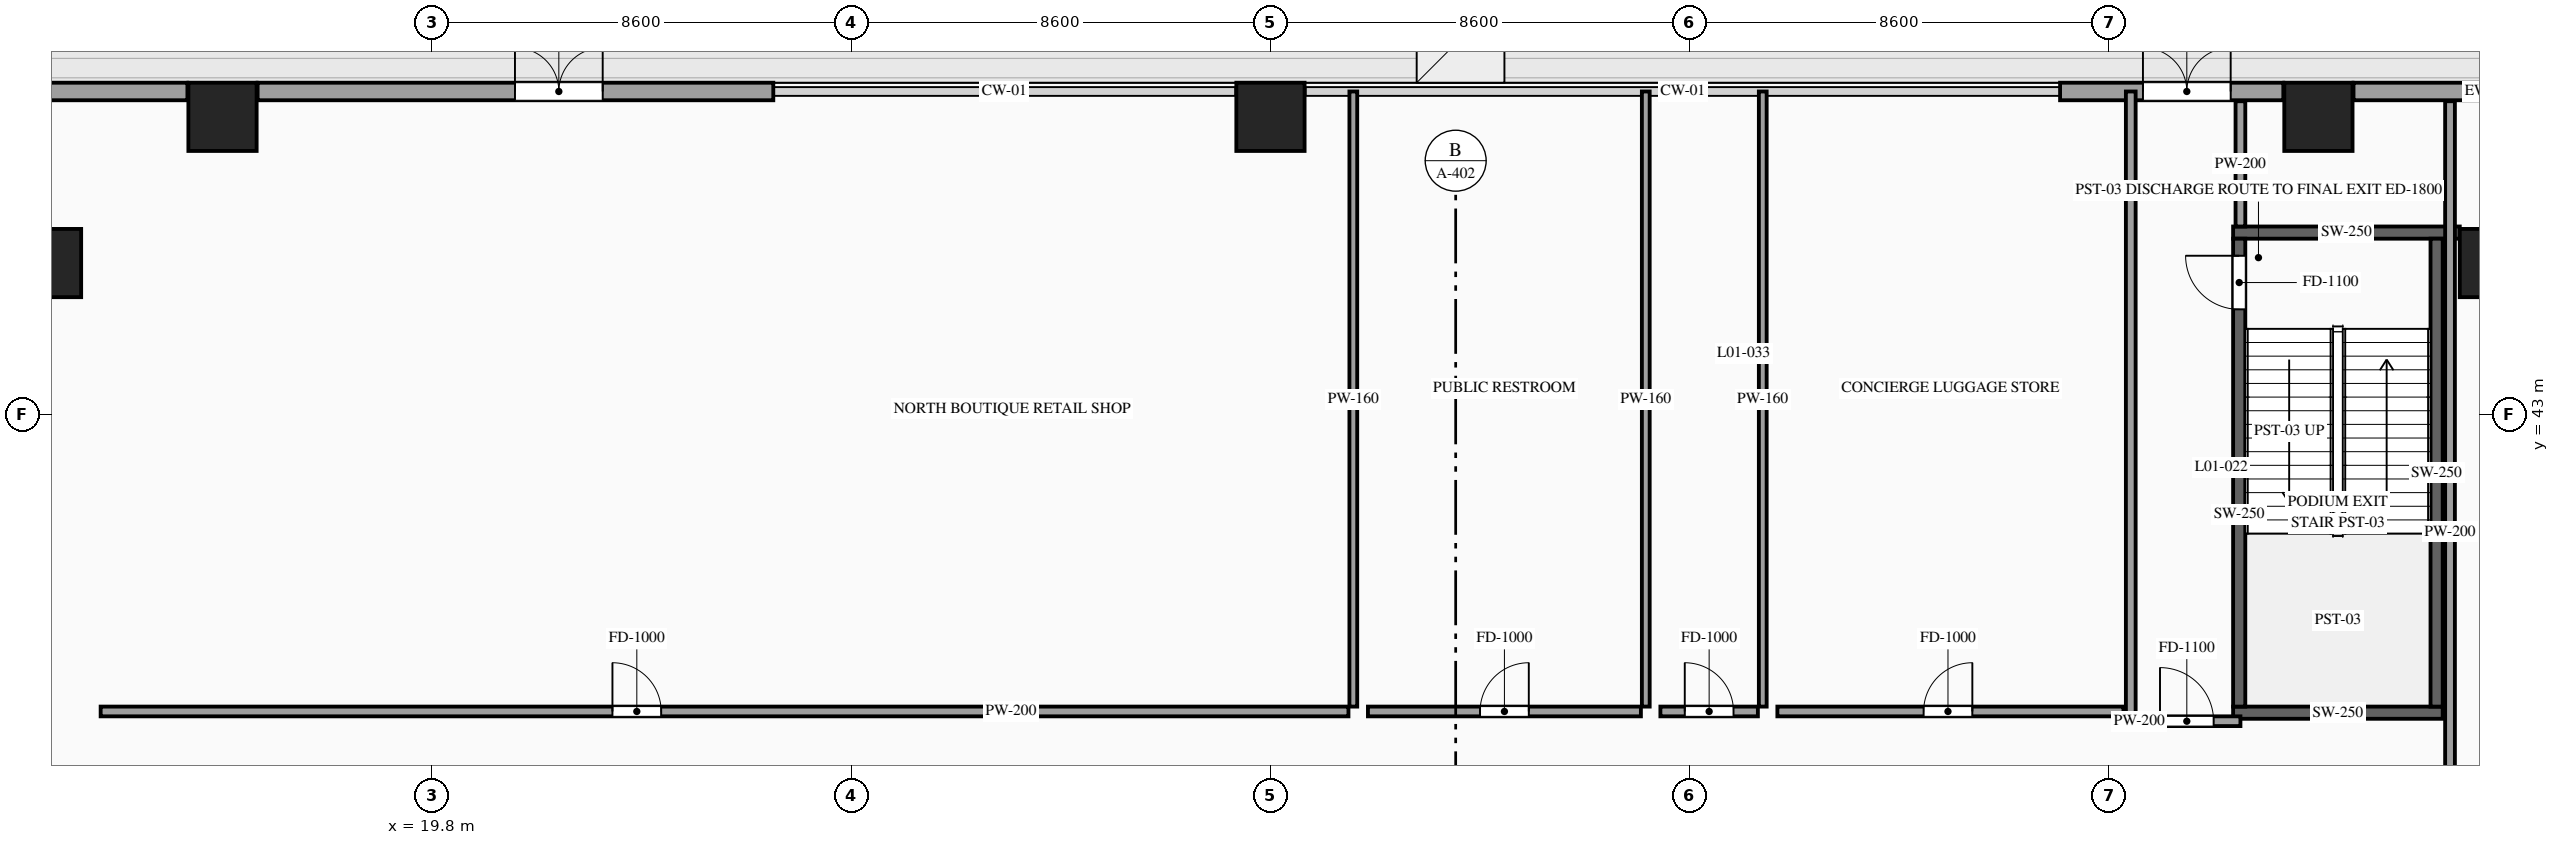
"""IFC4 building model, lengths in metres.
Left out: names, types, materials, properties, quantities, classifications, styles, units other than length and angle.
Written with IfcOpenShell. Run it as: python <this file> out.ifc"""

import sys

from ifc_helpers import new_model, si_unit, direction, frame, frame_2d, origin, origin_2d, place, context, subcontext, project, spatial, rectangle, extrude, source, transform, mapped, element, fill, save


model = new_model("IFC4")
c1 = context("Model", 3, precision=1e-05, world=origin(), true_north=direction((0.0, 1.0)))
c2 = subcontext(c1, "Body", "Model", "MODEL_VIEW")
j1 = project(units=[si_unit("LENGTHUNIT", "METRE"), si_unit("PLANEANGLEUNIT", "RADIAN")], contexts=[c1])
p1 = place(None, origin())
s1 = spatial("IfcSite", under=j1, at=p1, CompositionType="ELEMENT")
p2 = place(p1, origin())
s2 = spatial("IfcBuilding", under=s1, at=p2, CompositionType="ELEMENT")
p3 = place(p2, origin())
s3 = spatial("IfcBuildingStorey", under=s2, at=p3, CompositionType="ELEMENT", Elevation=0.0)
m1 = source(origin(), c2, "Body", "SweptSolid", [
    extrude(rectangle(XDim=1.4, YDim=1.4, at=origin_2d()), origin(), (0.0, 0.0, 1.0), 5.4),
])
for number, where, z_axis, x_axis in (
    (1, (11.9, 46.1, 0.0), (0.0, 0.0, 1.0), (1.0, 0.0, 0.0)),
    (2, (62.1, 46.1, 0.0), (0.0, 0.0, 1.0), (1.0, 0.0, 0.0)),
    (3, (15.5, 49.1, 0.0), (0.0, 0.0, 1.0), (1.0, 0.0, 0.0)),
    (4, (37.0, 49.1, 0.0), (0.0, 0.0, 1.0), (1.0, 0.0, 0.0)),
    (5, (58.5, 49.1, 0.0), (0.0, 0.0, 1.0), (1.0, 0.0, 0.0)),
):
    element("IfcColumn", number, at=place(p3, frame(where, z_axis=z_axis, x_axis=x_axis)), inside=s3, PredefinedType="COLUMN", context=c2, shape_type="MappedRepresentation", body=[
        mapped(m1, transform((0.0, 0.0, 0.0), scale=1.0)),
    ])
p4 = place(p3, frame((2.0, 49.62, 0.0), z_axis=(0.0, 0.0, 1.0), x_axis=(1.0, 0.0, 0.0)))
e6 = element("IfcWall", 6, at=p4, inside=s3, PredefinedType="SOLIDWALL", context=c2, shape_type="SweptSolid", body=[
    extrude(rectangle(XDim=12.78, YDim=0.36, at=frame_2d((6.39, 0.0))), origin(), (0.0, 0.0, 1.0), 5.12),
])
p5 = place(p4, frame((3.9, 0.0, 0.0)))
e7 = element("IfcOpeningElement", 7, at=p5, cuts=e6, PredefinedType="OPENING", context=c2, shape_type="SweptSolid", body=[
    extrude(rectangle(XDim=4.2, YDim=2.8, at=frame_2d((2.1, 1.4))), frame((0.0, 0.195, 0.0), z_axis=(0.0, -1.0, 0.0), x_axis=(1.0, 0.0, 0.0)), (0.0, 0.0, 1.0), 0.39),
])
p6 = place(p3, frame((59.22, 49.62, 0.0), z_axis=(0.0, 0.0, 1.0), x_axis=(1.0, 0.0, 0.0)))
e8 = element("IfcWall", 8, at=p6, inside=s3, PredefinedType="SOLIDWALL", context=c2, shape_type="SweptSolid", body=[
    extrude(rectangle(XDim=12.78, YDim=0.36, at=frame_2d((6.39, 0.0))), origin(), (0.0, 0.0, 1.0), 5.12),
])
p7 = place(p6, frame((5.88, 0.0, 0.0)))
e9 = element("IfcOpeningElement", 9, at=p7, cuts=e8, PredefinedType="OPENING", context=c2, shape_type="SweptSolid", body=[
    extrude(rectangle(XDim=1.8, YDim=2.4, at=frame_2d((0.9, 1.2))), frame((0.0, 0.195, 0.0), z_axis=(0.0, -1.0, 0.0), x_axis=(1.0, 0.0, 0.0)), (0.0, 0.0, 1.0), 0.39),
])
p8 = place(p3, frame((16.22, 49.62, 0.0), z_axis=(0.0, 0.0, 1.0), x_axis=(1.0, 0.0, 0.0)))
e10 = element("IfcWall", 10, at=p8, inside=s3, PredefinedType="SOLIDWALL", context=c2, shape_type="SweptSolid", body=[
    extrude(rectangle(XDim=10.58, YDim=0.36, at=frame_2d((5.29, 0.0))), origin(), (0.0, 0.0, 1.0), 5.12),
])
p9 = place(p8, frame((5.28, 0.0, 0.0)))
e11 = element("IfcOpeningElement", 11, at=p9, cuts=e10, PredefinedType="OPENING", context=c2, shape_type="SweptSolid", body=[
    extrude(rectangle(XDim=1.8, YDim=2.4, at=frame_2d((0.9, 1.2))), frame((0.0, 0.195, 0.0), z_axis=(0.0, -1.0, 0.0), x_axis=(1.0, 0.0, 0.0)), (0.0, 0.0, 1.0), 0.39),
])
p10 = place(p3, frame((53.2, 49.62, 0.0), z_axis=(0.0, 0.0, 1.0), x_axis=(1.0, 0.0, 0.0)))
e12 = element("IfcWall", 12, at=p10, inside=s3, PredefinedType="SOLIDWALL", context=c2, shape_type="SweptSolid", body=[
    extrude(rectangle(XDim=4.58, YDim=0.36, at=frame_2d((2.29, 0.0))), origin(), (0.0, 0.0, 1.0), 5.12),
])
p11 = place(p10, frame((1.7, 0.0, 0.0)))
e13 = element("IfcOpeningElement", 13, at=p11, cuts=e12, PredefinedType="OPENING", context=c2, shape_type="SweptSolid", body=[
    extrude(rectangle(XDim=1.8, YDim=2.4, at=frame_2d((0.9, 1.2))), frame((0.0, 0.195, 0.0), z_axis=(0.0, -1.0, 0.0), x_axis=(1.0, 0.0, 0.0)), (0.0, 0.0, 1.0), 0.39),
])
m2 = source(origin(), c2, "Body", "SweptSolid", [
    extrude(rectangle(XDim=4.3, YDim=0.25, at=frame_2d((2.15, 0.0))), origin(), (0.0, 0.0, 1.0), 5.12),
])
p12 = place(p3, frame((56.75, 36.875, 0.0), z_axis=(0.0, 0.0, 1.0), x_axis=(1.0, 0.0, 0.0)))
e14 = element("IfcWall", 14, at=p12, inside=s3, PredefinedType="SOLIDWALL", context=c2, shape_type="MappedRepresentation", body=[
    mapped(m2, transform((0.0, 0.0, 0.0), scale=1.0)),
])
m3 = source(origin(), c2, "Body", "SweptSolid", [
    extrude(rectangle(XDim=4.65, YDim=0.25, at=frame_2d((2.325, 0.0))), origin(), (0.0, 0.0, 1.0), 5.12),
])
p13 = place(p3, frame((56.75, 46.725, 0.0), z_axis=(0.0, 0.0, 1.0), x_axis=(1.0, 0.0, 0.0)))
e15 = element("IfcWall", 15, at=p13, inside=s3, PredefinedType="SOLIDWALL", context=c2, shape_type="MappedRepresentation", body=[
    mapped(m3, transform((0.0, 0.0, 0.0), scale=1.0)),
])
p14 = place(p3, frame((56.875, 37.0, 0.0), z_axis=(0.0, 0.0, 1.0), x_axis=(0.0, 1.0, 0.0)))
e16 = element("IfcWall", 16, at=p14, inside=s3, PredefinedType="SOLIDWALL", context=c2, shape_type="SweptSolid", body=[
    extrude(rectangle(XDim=9.6, YDim=0.25, at=frame_2d((4.8, 0.0))), origin(), (0.0, 0.0, 1.0), 5.12),
])
p15 = place(p14, frame((8.15, 0.0, 0.0)))
e17 = element("IfcOpeningElement", 17, at=p15, cuts=e16, PredefinedType="OPENING", context=c2, shape_type="SweptSolid", body=[
    extrude(rectangle(XDim=1.1, YDim=2.2, at=frame_2d((0.55, 1.1))), frame((0.0, 0.14, 0.0), z_axis=(0.0, -1.0, 0.0), x_axis=(1.0, 0.0, 0.0)), (0.0, 0.0, 1.0), 0.28),
])
m4 = source(origin(), c2, "Body", "SweptSolid", [
    extrude(rectangle(XDim=9.6, YDim=0.25, at=frame_2d((4.8, 0.0))), origin(), (0.0, 0.0, 1.0), 5.12),
])
p16 = place(p3, frame((60.925, 37.0, 0.0), z_axis=(0.0, 0.0, 1.0), x_axis=(0.0, 1.0, 0.0)))
e18 = element("IfcWall", 18, at=p16, inside=s3, PredefinedType="SOLIDWALL", context=c2, shape_type="MappedRepresentation", body=[
    mapped(m4, transform((0.0, 0.0, 0.0), scale=1.0)),
])
p17 = place(p3, frame((54.65, 36.7, 0.0), z_axis=(0.0, 0.0, 1.0), x_axis=(1.0, 0.0, 0.0)))
e19 = element("IfcWall", 19, at=p17, inside=s3, PredefinedType="PARTITIONING", context=c2, shape_type="SweptSolid", body=[
    extrude(rectangle(XDim=2.25, YDim=0.2, at=frame_2d((1.125, 0.0))), origin(), (0.0, 0.0, 1.0), 5.12),
])
p18 = place(p17, frame((0.6, 0.0, 0.0)))
e20 = element("IfcOpeningElement", 20, at=p18, cuts=e19, PredefinedType="OPENING", context=c2, shape_type="SweptSolid", body=[
    extrude(rectangle(XDim=1.1, YDim=2.2, at=frame_2d((0.55, 1.1))), frame((0.0, 0.115, 0.0), z_axis=(0.0, -1.0, 0.0), x_axis=(1.0, 0.0, 0.0)), (0.0, 0.0, 1.0), 0.23),
])
m5 = source(origin(), c2, "Body", "SweptSolid", [
    extrude(rectangle(XDim=12.82, YDim=0.2, at=frame_2d((6.41, 0.0))), origin(), (0.0, 0.0, 1.0), 5.12),
])
p19 = place(p3, frame((54.65, 36.8, 0.0), z_axis=(0.0, 0.0, 1.0), x_axis=(0.0, 1.0, 0.0)))
e21 = element("IfcWall", 21, at=p19, inside=s3, PredefinedType="PARTITIONING", context=c2, shape_type="MappedRepresentation", body=[
    mapped(m5, transform((0.0, 0.0, 0.0), scale=1.0)),
])
m6 = source(origin(), c2, "Body", "SweptSolid", [
    extrude(rectangle(XDim=2.57, YDim=0.2, at=frame_2d((1.285, 0.0))), origin(), (0.0, 0.0, 1.0), 5.12),
])
p20 = place(p3, frame((56.9, 46.85, 0.0), z_axis=(0.0, 0.0, 1.0), x_axis=(0.0, 1.0, 0.0)))
e22 = element("IfcWall", 22, at=p20, inside=s3, PredefinedType="PARTITIONING", context=c2, shape_type="MappedRepresentation", body=[
    mapped(m6, transform((0.0, 0.0, 0.0), scale=1.0)),
])
p21 = place(p3, frame((61.2, 24.8, 0.0), z_axis=(0.0, 0.0, 1.0), x_axis=(0.0, 1.0, 0.0)))
e23 = element("IfcWall", 23, at=p21, inside=s3, PredefinedType="PARTITIONING", context=c2, shape_type="SweptSolid", body=[
    extrude(rectangle(XDim=24.62, YDim=0.2, at=frame_2d((12.31, 0.0))), origin(), (0.0, 0.0, 1.0), 5.12),
])
p22 = place(p21, frame((5.7, 0.0, 0.0)))
e24 = element("IfcOpeningElement", 24, at=p22, cuts=e23, PredefinedType="OPENING", context=c2, shape_type="SweptSolid", body=[
    extrude(rectangle(XDim=1.0, YDim=2.2, at=frame_2d((0.5, 1.1))), frame((0.0, 0.115, 0.0), z_axis=(0.0, -1.0, 0.0), x_axis=(1.0, 0.0, 0.0)), (0.0, 0.0, 1.0), 0.23),
])
p23 = place(p3, frame((13.0, 36.9, 0.0), z_axis=(0.0, 0.0, 1.0), x_axis=(1.0, 0.0, 0.0)))
e25 = element("IfcWall", 25, at=p23, inside=s3, PredefinedType="PARTITIONING", context=c2, shape_type="SweptSolid", body=[
    extrude(rectangle(XDim=25.6, YDim=0.2, at=frame_2d((12.8, 0.0))), origin(), (0.0, 0.0, 1.0), 5.12),
])
p24 = place(p23, frame((10.5, 0.0, 0.0)))
e26 = element("IfcOpeningElement", 26, at=p24, cuts=e25, PredefinedType="OPENING", context=c2, shape_type="SweptSolid", body=[
    extrude(rectangle(XDim=1.0, YDim=2.2, at=frame_2d((0.5, 1.1))), frame((0.0, 0.115, 0.0), z_axis=(0.0, -1.0, 0.0), x_axis=(1.0, 0.0, 0.0)), (0.0, 0.0, 1.0), 0.23),
])
m7 = source(origin(), c2, "Body", "SweptSolid", [
    extrude(rectangle(XDim=12.62, YDim=0.16, at=frame_2d((6.31, 0.0))), origin(), (0.0, 0.0, 1.0), 5.12),
])
p25 = place(p3, frame((38.7, 37.0, 0.0), z_axis=(0.0, 0.0, 1.0), x_axis=(0.0, 1.0, 0.0)))
e27 = element("IfcWall", 27, at=p25, inside=s3, PredefinedType="PARTITIONING", context=c2, shape_type="MappedRepresentation", body=[
    mapped(m7, transform((0.0, 0.0, 0.0), scale=1.0)),
])
p26 = place(p3, frame((39.0, 36.9, 0.0), z_axis=(0.0, 0.0, 1.0), x_axis=(1.0, 0.0, 0.0)))
e28 = element("IfcWall", 28, at=p26, inside=s3, PredefinedType="PARTITIONING", context=c2, shape_type="SweptSolid", body=[
    extrude(rectangle(XDim=5.6, YDim=0.2, at=frame_2d((2.8, 0.0))), origin(), (0.0, 0.0, 1.0), 5.12),
])
p27 = place(p26, frame((2.3, 0.0, 0.0)))
e29 = element("IfcOpeningElement", 29, at=p27, cuts=e28, PredefinedType="OPENING", context=c2, shape_type="SweptSolid", body=[
    extrude(rectangle(XDim=1.0, YDim=2.2, at=frame_2d((0.5, 1.1))), frame((0.0, 0.115, 0.0), z_axis=(0.0, -1.0, 0.0), x_axis=(1.0, 0.0, 0.0)), (0.0, 0.0, 1.0), 0.23),
])
p28 = place(p3, frame((44.7, 37.0, 0.0), z_axis=(0.0, 0.0, 1.0), x_axis=(0.0, 1.0, 0.0)))
e30 = element("IfcWall", 30, at=p28, inside=s3, PredefinedType="PARTITIONING", context=c2, shape_type="MappedRepresentation", body=[
    mapped(m7, transform((0.0, 0.0, 0.0), scale=1.0)),
])
p29 = place(p3, frame((45.0, 36.9, 0.0), z_axis=(0.0, 0.0, 1.0), x_axis=(1.0, 0.0, 0.0)))
e31 = element("IfcWall", 31, at=p29, inside=s3, PredefinedType="PARTITIONING", context=c2, shape_type="SweptSolid", body=[
    extrude(rectangle(XDim=2.0, YDim=0.2, at=frame_2d((1.0, 0.0))), origin(), (0.0, 0.0, 1.0), 5.12),
])
p30 = place(p29, frame((0.5, 0.0, 0.0)))
e32 = element("IfcOpeningElement", 32, at=p30, cuts=e31, PredefinedType="OPENING", context=c2, shape_type="SweptSolid", body=[
    extrude(rectangle(XDim=1.0, YDim=2.2, at=frame_2d((0.5, 1.1))), frame((0.0, 0.115, 0.0), z_axis=(0.0, -1.0, 0.0), x_axis=(1.0, 0.0, 0.0)), (0.0, 0.0, 1.0), 0.23),
])
p31 = place(p3, frame((47.1, 37.0, 0.0), z_axis=(0.0, 0.0, 1.0), x_axis=(0.0, 1.0, 0.0)))
e33 = element("IfcWall", 33, at=p31, inside=s3, PredefinedType="PARTITIONING", context=c2, shape_type="MappedRepresentation", body=[
    mapped(m7, transform((0.0, 0.0, 0.0), scale=1.0)),
])
p32 = place(p3, frame((47.4, 36.9, 0.0), z_axis=(0.0, 0.0, 1.0), x_axis=(1.0, 0.0, 0.0)))
e34 = element("IfcWall", 34, at=p32, inside=s3, PredefinedType="PARTITIONING", context=c2, shape_type="SweptSolid", body=[
    extrude(rectangle(XDim=7.1, YDim=0.2, at=frame_2d((3.55, 0.0))), origin(), (0.0, 0.0, 1.0), 5.12),
])
p33 = place(p32, frame((3.0, 0.0, 0.0)))
e35 = element("IfcOpeningElement", 35, at=p33, cuts=e34, PredefinedType="OPENING", context=c2, shape_type="SweptSolid", body=[
    extrude(rectangle(XDim=1.0, YDim=2.2, at=frame_2d((0.5, 1.1))), frame((0.0, 0.115, 0.0), z_axis=(0.0, -1.0, 0.0), x_axis=(1.0, 0.0, 0.0)), (0.0, 0.0, 1.0), 0.23),
])
m8 = source(origin(), c2, "Body", "SweptSolid", [
    extrude(rectangle(XDim=1.8, YDim=2.4, at=frame_2d((0.9, 1.2))), frame((0.0, 0.025, 0.0), z_axis=(0.0, -1.0, 0.0), x_axis=(1.0, 0.0, 0.0)), (0.0, 0.0, 1.0), 0.05),
])
p34 = place(p9, origin())
e36 = element("IfcDoor", 36, at=p34, inside=s3, OperationType="DOUBLE_DOOR_SINGLE_SWING", PredefinedType="DOOR", context=c2, shape_type="MappedRepresentation", body=[
    mapped(m8, transform((0.0, 0.0, 0.0), scale=1.0)),
])
fill(e11, e36)
p35 = place(p11, origin())
e37 = element("IfcDoor", 37, at=p35, inside=s3, OperationType="DOUBLE_DOOR_SINGLE_SWING", PredefinedType="DOOR", context=c2, shape_type="MappedRepresentation", body=[
    mapped(m8, transform((0.0, 0.0, 0.0), scale=1.0)),
])
fill(e13, e37)
m9 = source(origin(), c2, "Body", "SweptSolid", [
    extrude(rectangle(XDim=1.1, YDim=2.2, at=frame_2d((0.55, 1.1))), frame((0.0, 0.025, 0.0), z_axis=(0.0, -1.0, 0.0), x_axis=(1.0, 0.0, 0.0)), (0.0, 0.0, 1.0), 0.05),
])
p36 = place(p15, origin())
e38 = element("IfcDoor", 38, at=p36, inside=s3, OperationType="SINGLE_SWING_RIGHT", PredefinedType="DOOR", context=c2, shape_type="MappedRepresentation", body=[
    mapped(m9, transform((0.0, 0.0, 0.0), scale=1.0)),
])
fill(e17, e38)
p37 = place(p18, origin())
e39 = element("IfcDoor", 39, at=p37, inside=s3, OperationType="SINGLE_SWING_LEFT", PredefinedType="DOOR", context=c2, shape_type="MappedRepresentation", body=[
    mapped(m9, transform((0.0, 0.0, 0.0), scale=1.0)),
])
fill(e20, e39)
m10 = source(origin(), c2, "Body", "SweptSolid", [
    extrude(rectangle(XDim=1.0, YDim=2.2, at=frame_2d((0.5, 1.1))), frame((0.0, 0.025, 0.0), z_axis=(0.0, -1.0, 0.0), x_axis=(1.0, 0.0, 0.0)), (0.0, 0.0, 1.0), 0.05),
])
p38 = place(p24, origin())
e40 = element("IfcDoor", 40, at=p38, inside=s3, OperationType="SINGLE_SWING_LEFT", PredefinedType="DOOR", context=c2, shape_type="MappedRepresentation", body=[
    mapped(m10, transform((0.0, 0.0, 0.0), scale=1.0)),
])
fill(e26, e40)
p39 = place(p27, origin())
e41 = element("IfcDoor", 41, at=p39, inside=s3, OperationType="SINGLE_SWING_RIGHT", PredefinedType="DOOR", context=c2, shape_type="MappedRepresentation", body=[
    mapped(m10, transform((0.0, 0.0, 0.0), scale=1.0)),
])
fill(e29, e41)
p40 = place(p30, origin())
e42 = element("IfcDoor", 42, at=p40, inside=s3, OperationType="SINGLE_SWING_LEFT", PredefinedType="DOOR", context=c2, shape_type="MappedRepresentation", body=[
    mapped(m10, transform((0.0, 0.0, 0.0), scale=1.0)),
])
fill(e32, e42)
p41 = place(p33, origin())
e43 = element("IfcDoor", 43, at=p41, inside=s3, OperationType="SINGLE_SWING_RIGHT", PredefinedType="DOOR", context=c2, shape_type="MappedRepresentation", body=[
    mapped(m10, transform((0.0, 0.0, 0.0), scale=1.0)),
])
fill(e35, e43)
save(model, sys.argv[1])
